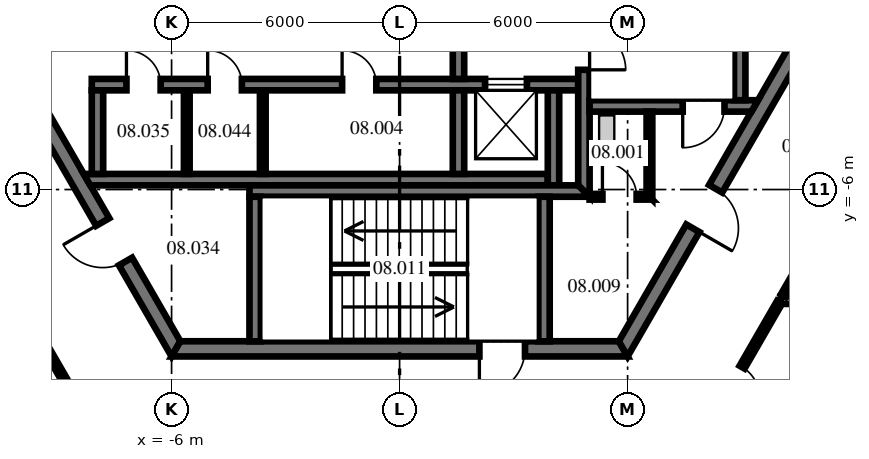
"""IFC4 building model, lengths in metres.
Left out: names, types, materials, properties, quantities, classifications, styles, units other than length and angle.
Written with IfcOpenShell. Run it as: python <this file> out.ifc"""

import sys

from ifc_helpers import new_model, si_unit, direction, frame, frame_2d, origin, place, context, subcontext, project, spatial, polyline, rectangle, outline, extrude, source, transform, mapped, element, fill, save


model = new_model("IFC4")
c1 = context("Model", 3, precision=1e-05, world=origin(), true_north=direction((0.0, 1.0)))
c2 = subcontext(c1, "Body", "Model", "MODEL_VIEW")
j1 = project(units=[si_unit("LENGTHUNIT", "METRE"), si_unit("PLANEANGLEUNIT", "RADIAN")], contexts=[c1])
p1 = place(None, origin())
s1 = spatial("IfcSite", under=j1, at=p1, CompositionType="ELEMENT")
p2 = place(p1, origin())
s2 = spatial("IfcBuilding", under=s1, at=p2, CompositionType="ELEMENT")
p3 = place(p2, frame((0.0, 0.0, 37.5)))
s3 = spatial("IfcBuildingStorey", under=s2, at=p3, CompositionType="ELEMENT", Elevation=37.5)
m1 = source(origin(), c2, "Body", "SweptSolid", [
    extrude(outline(polyline([(-0.115, -0.2), (11.885, -0.2), (11.654, 0.2), (0.115, 0.2), (-0.115, -0.2)])), origin(), (0.0, 0.0, 1.0), 4.1),
])
p4 = place(p3, frame((-11.769, 0.0, 0.0), z_axis=(0.0, 0.0, 1.0), x_axis=(0.499996592174, -0.866027371285, 0.0)))
e1 = element("IfcWall", 1, at=p4, inside=s3, PredefinedType="SHEAR", context=c2, shape_type="MappedRepresentation", body=[
    mapped(m1, transform((0.0, 0.0, 0.0), scale=1.0)),
])
p5 = place(p4, frame((1.405, 0.0, 0.0)))
e2 = element("IfcOpeningElement", 2, at=p5, cuts=e1, PredefinedType="OPENING", context=c2, shape_type="SweptSolid", body=[
    extrude(rectangle(XDim=1.8, YDim=2.1, at=frame_2d((0.9, 1.05))), frame((0.0, 0.21, 0.0), z_axis=(0.0, -1.0, 0.0), x_axis=(1.0, 0.0, 0.0)), (0.0, 0.0, 1.0), 0.42),
])
p6 = place(p4, frame((7.915, 0.0, 0.0)))
e3 = element("IfcOpeningElement", 3, at=p6, cuts=e1, PredefinedType="OPENING", context=c2, shape_type="SweptSolid", body=[
    extrude(rectangle(XDim=1.2, YDim=2.1, at=frame_2d((0.6, 1.05))), frame((0.0, 0.21, 0.0), z_axis=(0.0, -1.0, 0.0), x_axis=(1.0, 0.0, 0.0)), (0.0, 0.0, 1.0), 0.42),
])
p7 = place(p3, frame((-5.885, -10.192, 0.0), z_axis=(0.0, 0.0, 1.0), x_axis=(1.0, 0.0, 0.0)))
e4 = element("IfcWall", 4, at=p7, inside=s3, PredefinedType="SHEAR", context=c2, shape_type="MappedRepresentation", body=[
    mapped(m1, transform((0.0, 0.0, 0.0), scale=1.0)),
])
p8 = place(p7, frame((7.985, 0.0, 0.0)))
e5 = element("IfcOpeningElement", 5, at=p8, cuts=e4, PredefinedType="OPENING", context=c2, shape_type="SweptSolid", body=[
    extrude(rectangle(XDim=1.2, YDim=2.1, at=frame_2d((0.6, 1.05))), frame((0.0, 0.21, 0.0), z_axis=(0.0, -1.0, 0.0), x_axis=(1.0, 0.0, 0.0)), (0.0, 0.0, 1.0), 0.42),
])
p9 = place(p3, frame((5.885, -10.192, 0.0), z_axis=(0.0, 0.0, 1.0), x_axis=(0.499996592174, 0.866027371285, 0.0)))
e6 = element("IfcWall", 6, at=p9, inside=s3, PredefinedType="SHEAR", context=c2, shape_type="MappedRepresentation", body=[
    mapped(m1, transform((0.0, 0.0, 0.0), scale=1.0)),
])
p10 = place(p9, frame((3.665, 0.0, 0.0)))
e7 = element("IfcOpeningElement", 7, at=p10, cuts=e6, PredefinedType="OPENING", context=c2, shape_type="SweptSolid", body=[
    extrude(rectangle(XDim=1.2, YDim=2.1, at=frame_2d((0.6, 1.05))), frame((0.0, 0.21, 0.0), z_axis=(0.0, -1.0, 0.0), x_axis=(1.0, 0.0, 0.0)), (0.0, 0.0, 1.0), 0.42),
])
m2 = source(origin(), c2, "Body", "SweptSolid", [
    extrude(rectangle(XDim=12.8, YDim=0.3, at=frame_2d((6.4, 0.0))), origin(), (0.0, 0.0, 1.0), 4.1),
])
p11 = place(p3, frame((-8.1, -3.24, 0.0), z_axis=(0.0, 0.0, 1.0), x_axis=(1.0, 0.0, 0.0)))
e8 = element("IfcWall", 8, at=p11, inside=s3, PredefinedType="SHEAR", context=c2, shape_type="MappedRepresentation", body=[
    mapped(m2, transform((0.0, 0.0, 0.0), scale=1.0)),
])
p12 = place(p11, frame((0.913, 0.0, 0.0)))
e9 = element("IfcOpeningElement", 9, at=p12, cuts=e8, PredefinedType="OPENING", context=c2, shape_type="SweptSolid", body=[
    extrude(rectangle(XDim=0.9, YDim=2.1, at=frame_2d((0.45, 1.05))), frame((0.0, 0.16, 0.0), z_axis=(0.0, -1.0, 0.0), x_axis=(1.0, 0.0, 0.0)), (0.0, 0.0, 1.0), 0.32),
])
p13 = place(p11, frame((3.05, 0.0, 0.0)))
e10 = element("IfcOpeningElement", 10, at=p13, cuts=e8, PredefinedType="OPENING", context=c2, shape_type="SweptSolid", body=[
    extrude(rectangle(XDim=0.9, YDim=2.1, at=frame_2d((0.45, 1.05))), frame((0.0, 0.16, 0.0), z_axis=(0.0, -1.0, 0.0), x_axis=(1.0, 0.0, 0.0)), (0.0, 0.0, 1.0), 0.32),
])
p14 = place(p11, frame((6.587, 0.0, 0.0)))
e11 = element("IfcOpeningElement", 11, at=p14, cuts=e8, PredefinedType="OPENING", context=c2, shape_type="SweptSolid", body=[
    extrude(rectangle(XDim=0.9, YDim=2.1, at=frame_2d((0.45, 1.05))), frame((0.0, 0.16, 0.0), z_axis=(0.0, -1.0, 0.0), x_axis=(1.0, 0.0, 0.0)), (0.0, 0.0, 1.0), 0.32),
])
p15 = place(p11, frame((10.35, 0.0, 0.0)))
e12 = element("IfcOpeningElement", 12, at=p15, cuts=e8, PredefinedType="OPENING", context=c2, shape_type="SweptSolid", body=[
    extrude(rectangle(XDim=1.1, YDim=2.1, at=frame_2d((0.55, 1.05))), frame((0.0, 0.16, 0.0), z_axis=(0.0, -1.0, 0.0), x_axis=(1.0, 0.0, 0.0)), (0.0, 0.0, 1.0), 0.32),
])
m3 = source(origin(), c2, "Body", "SweptSolid", [
    extrude(outline(polyline([(12.0, -0.15), (-0.04, -0.15), (-0.213, 0.15), (12.0, 0.15), (12.0, -0.15)])), origin(), (0.0, 0.0, 1.0), 4.1),
])
p16 = place(p3, frame((-8.1, -5.74, 0.0), z_axis=(0.0, 0.0, 1.0), x_axis=(1.0, 0.0, 0.0)))
e13 = element("IfcWall", 13, at=p16, inside=s3, PredefinedType="SHEAR", context=c2, shape_type="MappedRepresentation", body=[
    mapped(m3, transform((0.0, 0.0, 0.0), scale=1.0)),
])
m4 = source(origin(), c2, "Body", "SweptSolid", [
    extrude(rectangle(XDim=2.2, YDim=0.3, at=frame_2d((1.1, 0.0))), origin(), (0.0, 0.0, 1.0), 4.1),
])
for number, where, z_axis, x_axis in (
    (14, (-7.95, -5.59, 0.0), (0.0, 0.0, 1.0), (0.0, 1.0, 0.0)),
    (15, (1.55, -5.59, 0.0), (0.0, 0.0, 1.0), (0.0, 1.0, 0.0)),
):
    element("IfcWall", number, at=place(p3, frame(where, z_axis=z_axis, x_axis=x_axis)), inside=s3, PredefinedType="SHEAR", context=c2, shape_type="MappedRepresentation", body=[
        mapped(m4, transform((0.0, 0.0, 0.0), scale=1.0)),
    ])
m5 = source(origin(), c2, "Body", "SweptSolid", [
    extrude(rectangle(XDim=2.5, YDim=0.3, at=frame_2d((1.25, 0.0))), origin(), (0.0, 0.0, 1.0), 4.1),
])
p17 = place(p3, frame((4.05, -5.89, 0.0), z_axis=(0.0, 0.0, 1.0), x_axis=(0.0, 1.0, 0.0)))
e16 = element("IfcWall", 16, at=p17, inside=s3, PredefinedType="SHEAR", context=c2, shape_type="MappedRepresentation", body=[
    mapped(m5, transform((0.0, 0.0, 0.0), scale=1.0)),
])
m6 = source(origin(), c2, "Body", "SweptSolid", [
    extrude(rectangle(XDim=3.0, YDim=0.3, at=frame_2d((1.5, 0.0))), origin(), (0.0, 0.0, 1.0), 4.1),
])
p18 = place(p3, frame((1.55, -3.09, 0.0), z_axis=(0.0, 0.0, 1.0), x_axis=(0.0, 1.0, 0.0)))
e17 = element("IfcWall", 17, at=p18, inside=s3, PredefinedType="SHEAR", context=c2, shape_type="MappedRepresentation", body=[
    mapped(m6, transform((0.0, 0.0, 0.0), scale=1.0)),
])
p19 = place(p18, frame((0.9, 0.0, 0.0)))
e18 = element("IfcOpeningElement", 18, at=p19, cuts=e17, PredefinedType="OPENING", context=c2, shape_type="SweptSolid", body=[
    extrude(rectangle(XDim=1.2, YDim=2.1, at=frame_2d((0.6, 1.05))), frame((0.0, 0.16, 0.0), z_axis=(0.0, -1.0, 0.0), x_axis=(1.0, 0.0, 0.0)), (0.0, 0.0, 1.0), 0.32),
])
m7 = source(origin(), c2, "Body", "SweptSolid", [
    extrude(outline(polyline([(-0.15, -0.15), (9.99, -0.15), (9.99, 0.15), (0.15, 0.15), (-0.15, -0.15)])), origin(), (0.0, 0.0, 1.0), 4.1),
])
p20 = place(p3, frame((4.85, -6.04, 0.0), z_axis=(0.0, 0.0, 1.0), x_axis=(0.0, 1.0, 0.0)))
e19 = element("IfcWall", 19, at=p20, inside=s3, PredefinedType="SHEAR", context=c2, shape_type="MappedRepresentation", body=[
    mapped(m7, transform((0.0, 0.0, 0.0), scale=1.0)),
])
p21 = place(p20, frame((3.19, 0.0, 0.0)))
e20 = element("IfcOpeningElement", 20, at=p21, cuts=e19, PredefinedType="OPENING", context=c2, shape_type="SweptSolid", body=[
    extrude(rectangle(XDim=1.1, YDim=2.1, at=frame_2d((0.55, 1.05))), frame((0.0, 0.16, 0.0), z_axis=(0.0, -1.0, 0.0), x_axis=(1.0, 0.0, 0.0)), (0.0, 0.0, 1.0), 0.32),
])
m8 = source(origin(), c2, "Body", "SweptSolid", [
    extrude(outline(polyline([(0.0, -0.15), (0.0, 0.15), (4.433, 0.15), (4.26, -0.15), (0.0, -0.15)])), origin(), (0.0, 0.0, 1.0), 4.1),
])
p22 = place(p3, frame((5.0, -3.8, 0.0), z_axis=(0.0, 0.0, 1.0), x_axis=(1.0, 0.0, 0.0)))
e21 = element("IfcWall", 21, at=p22, inside=s3, PredefinedType="SHEAR", context=c2, shape_type="MappedRepresentation", body=[
    mapped(m8, transform((0.0, 0.0, 0.0), scale=1.0)),
])
p23 = place(p22, frame((2.45, 0.0, 0.0)))
e22 = element("IfcOpeningElement", 22, at=p23, cuts=e21, PredefinedType="OPENING", context=c2, shape_type="SweptSolid", body=[
    extrude(rectangle(XDim=1.1, YDim=2.1, at=frame_2d((0.55, 1.05))), frame((0.0, 0.16, 0.0), z_axis=(0.0, -1.0, 0.0), x_axis=(1.0, 0.0, 0.0)), (0.0, 0.0, 1.0), 0.32),
])
m9 = source(origin(), c2, "Body", "SweptSolid", [
    extrude(rectangle(XDim=7.3, YDim=0.3, at=frame_2d((3.65, 0.0))), origin(), (0.0, 0.0, 1.0), 4.1),
])
p24 = place(p3, frame((8.95, -3.65, 0.0), z_axis=(0.0, 0.0, 1.0), x_axis=(0.0, 1.0, 0.0)))
e23 = element("IfcWall", 23, at=p24, inside=s3, PredefinedType="SHEAR", context=c2, shape_type="MappedRepresentation", body=[
    mapped(m9, transform((0.0, 0.0, 0.0), scale=1.0)),
])
m10 = source(origin(), c2, "Body", "SweptSolid", [
    extrude(outline(polyline([(0.0, -0.15), (8.95, -0.15), (8.65, 0.15), (0.0, 0.15), (0.0, -0.15)])), origin(), (0.0, 0.0, 1.0), 4.1),
])
p25 = place(p3, frame((-3.95, -6.04, 0.0), z_axis=(0.0, 0.0, 1.0), x_axis=(1.0, 0.0, 0.0)))
e24 = element("IfcWall", 24, at=p25, inside=s3, PredefinedType="SHEAR", context=c2, shape_type="MappedRepresentation", body=[
    mapped(m10, transform((0.0, 0.0, 0.0), scale=1.0)),
])
m11 = source(origin(), c2, "Body", "SweptSolid", [
    extrude(outline(polyline([(3.8, -0.15), (-0.004, -0.15), (-0.004, 0.15), (3.8, 0.15), (3.8, -0.15)])), origin(), (0.0, 0.0, 1.0), 4.1),
])
for number, where, z_axis, x_axis in (
    (25, (-3.8, -9.99, 0.0), (0.0, 0.0, 1.0), (0.0, 1.0, 0.0)),
    (26, (3.8, -9.99, 0.0), (0.0, 0.0, 1.0), (0.0, 1.0, 0.0)),
):
    element("IfcWall", number, at=place(p3, frame(where, z_axis=z_axis, x_axis=x_axis)), inside=s3, PredefinedType="SHEAR", context=c2, shape_type="MappedRepresentation", body=[
        mapped(m11, transform((0.0, 0.0, 0.0), scale=1.0)),
    ])
m12 = source(origin(), c2, "Body", "SweptSolid", [
    extrude(outline(polyline([(0.0, -0.075), (1.65, -0.075), (1.5, 0.075), (0.0, 0.075), (0.0, -0.075)])), origin(), (0.0, 0.0, 1.0), 4.1),
])
p26 = place(p3, frame((5.0, -6.19, 0.0), z_axis=(0.0, 0.0, 1.0), x_axis=(1.0, 0.0, 0.0)))
e27 = element("IfcWall", 27, at=p26, inside=s3, PredefinedType="PARTITIONING", context=c2, shape_type="MappedRepresentation", body=[
    mapped(m12, transform((0.0, 0.0, 0.0), scale=1.0)),
])
p27 = place(p26, frame((0.337, 0.0, 0.0)))
e28 = element("IfcOpeningElement", 28, at=p27, cuts=e27, PredefinedType="OPENING", context=c2, shape_type="SweptSolid", body=[
    extrude(rectangle(XDim=0.9, YDim=2.1, at=frame_2d((0.45, 1.05))), frame((0.0, 0.085, 0.0), z_axis=(0.0, -1.0, 0.0), x_axis=(1.0, 0.0, 0.0)), (0.0, 0.0, 1.0), 0.17),
])
m13 = source(origin(), c2, "Body", "SweptSolid", [
    extrude(outline(polyline([(-0.075, -0.075), (2.24, -0.075), (2.24, 0.075), (0.075, 0.075), (-0.075, -0.075)])), origin(), (0.0, 0.0, 1.0), 4.1),
])
p28 = place(p3, frame((6.575, -6.19, 0.0), z_axis=(0.0, 0.0, 1.0), x_axis=(0.0, 1.0, 0.0)))
e29 = element("IfcWall", 29, at=p28, inside=s3, PredefinedType="PARTITIONING", context=c2, shape_type="MappedRepresentation", body=[
    mapped(m13, transform((0.0, 0.0, 0.0), scale=1.0)),
])
m14 = source(origin(), c2, "Body", "SweptSolid", [
    extrude(rectangle(XDim=2.2, YDim=0.15, at=frame_2d((1.1, 0.0))), origin(), (0.0, 0.0, 1.0), 4.1),
])
for number, where, z_axis, x_axis in (
    (30, (-5.6, -5.59, 0.0), (0.0, 0.0, 1.0), (0.0, 1.0, 0.0)),
    (31, (-3.6, -5.59, 0.0), (0.0, 0.0, 1.0), (0.0, 1.0, 0.0)),
):
    element("IfcWall", number, at=place(p3, frame(where, z_axis=z_axis, x_axis=x_axis)), inside=s3, PredefinedType="PARTITIONING", context=c2, shape_type="MappedRepresentation", body=[
        mapped(m14, transform((0.0, 0.0, 0.0), scale=1.0)),
    ])
p29 = place(p3, frame((-9.527, -9.783, 0.0), z_axis=(0.0, 0.0, 1.0), x_axis=(0.500013098431, -0.86601784127, 0.0)))
e32 = element("IfcWall", 32, at=p29, inside=s3, PredefinedType="PARTITIONING", context=c2, shape_type="SweptSolid", body=[
    extrude(rectangle(XDim=3.83, YDim=0.15, at=frame_2d((1.915, 0.0))), origin(), (0.0, 0.0, 1.0), 4.1),
])
m15 = source(origin(), c2, "Body", "SweptSolid", [
    extrude(rectangle(XDim=11.455, YDim=0.2, at=frame_2d((5.728, 0.0))), origin(), (0.0, 0.0, 1.0), 3.343),
])
p30 = place(p3, frame((10.031, -8.91, 0.0), z_axis=(0.0, 0.0, 1.0), x_axis=(1.0, 0.0, 0.0)))
e33 = element("IfcWall", 33, at=p30, inside=s3, PredefinedType="PARTITIONING", context=c2, shape_type="MappedRepresentation", body=[
    mapped(m15, transform((0.0, 0.0, 0.0), scale=1.0)),
])
p31 = place(p3, frame((7.603, -13.116, 0.0), z_axis=(0.0, 0.0, 1.0), x_axis=(0.500011970786, 0.866018492338, 0.0)))
e34 = element("IfcWall", 34, at=p31, inside=s3, PredefinedType="PARTITIONING", context=c2, shape_type="SweptSolid", body=[
    extrude(rectangle(XDim=4.793, YDim=0.15, at=frame_2d((2.397, 0.0))), origin(), (0.0, 0.0, 1.0), 4.1),
])
p32 = place(p31, frame((1.92, 0.0, 0.0)))
e35 = element("IfcOpeningElement", 35, at=p32, cuts=e34, PredefinedType="OPENING", context=c2, shape_type="SweptSolid", body=[
    extrude(rectangle(XDim=0.9, YDim=2.1, at=frame_2d((0.45, 1.05))), frame((0.0, 0.085, 0.0), z_axis=(0.0, -1.0, 0.0), x_axis=(1.0, 0.0, 0.0)), (0.0, 0.0, 1.0), 0.17),
])
p33 = place(p3, frame((10.1, -8.792, 0.0), z_axis=(0.0, 0.0, 1.0), x_axis=(0.499985875816, 0.866033558232, 0.0)))
e36 = element("IfcWall", 36, at=p33, inside=s3, PredefinedType="PARTITIONING", context=c2, shape_type="SweptSolid", body=[
    extrude(rectangle(XDim=10.082, YDim=0.15, at=frame_2d((5.041, 0.0))), origin(), (0.0, 0.0, 1.0), 4.1),
])
p34 = place(p8, frame((1.2, 0.0, 0.0), z_axis=(0.0, 0.0, 1.0), x_axis=(-1.0, 0.0, 0.0)))
e37 = element("IfcDoor", 37, at=p34, inside=s3, OperationType="SINGLE_SWING_RIGHT", PredefinedType="DOOR", context=c2, shape_type="SweptSolid", body=[
    extrude(rectangle(XDim=1.2, YDim=2.1, at=frame_2d((0.6, 1.05))), frame((0.0, 0.025, 0.0), z_axis=(0.0, -1.0, 0.0), x_axis=(1.0, 0.0, 0.0)), (0.0, 0.0, 1.0), 0.05),
])
fill(e5, e37)
p35 = place(p10, frame((1.2, 0.0, 0.0), z_axis=(0.0, 0.0, 1.0), x_axis=(-1.0, 0.0, 0.0)))
e38 = element("IfcDoor", 38, at=p35, inside=s3, OperationType="SINGLE_SWING_RIGHT", PredefinedType="DOOR", context=c2, shape_type="SweptSolid", body=[
    extrude(rectangle(XDim=1.2, YDim=2.1, at=frame_2d((0.6, 1.05))), frame((0.0, 0.025, 0.0), z_axis=(0.0, -1.0, 0.0), x_axis=(1.0, 0.0, 0.0)), (0.0, 0.0, 1.0), 0.05),
])
fill(e7, e38)
p36 = place(p6, frame((1.2, 0.0, 0.0), z_axis=(0.0, 0.0, 1.0), x_axis=(-1.0, 0.0, 0.0)))
e39 = element("IfcDoor", 39, at=p36, inside=s3, OperationType="SINGLE_SWING_RIGHT", PredefinedType="DOOR", context=c2, shape_type="SweptSolid", body=[
    extrude(rectangle(XDim=1.2, YDim=2.1, at=frame_2d((0.6, 1.05))), frame((0.0, 0.025, 0.0), z_axis=(0.0, -1.0, 0.0), x_axis=(1.0, 0.0, 0.0)), (0.0, 0.0, 1.0), 0.05),
])
fill(e3, e39)
p37 = place(p21, frame((1.1, 0.0, 0.0), z_axis=(0.0, 0.0, 1.0), x_axis=(-1.0, 0.0, 0.0)))
e40 = element("IfcDoor", 40, at=p37, inside=s3, OperationType="SINGLE_SWING_RIGHT", PredefinedType="DOOR", context=c2, shape_type="SweptSolid", body=[
    extrude(rectangle(XDim=1.1, YDim=2.1, at=frame_2d((0.55, 1.05))), frame((0.0, 0.025, 0.0), z_axis=(0.0, -1.0, 0.0), x_axis=(1.0, 0.0, 0.0)), (0.0, 0.0, 1.0), 0.05),
])
fill(e20, e40)
p38 = place(p23, frame((1.1, 0.0, 0.0), z_axis=(0.0, 0.0, 1.0), x_axis=(-1.0, 0.0, 0.0)))
e41 = element("IfcDoor", 41, at=p38, inside=s3, OperationType="SINGLE_SWING_RIGHT", PredefinedType="DOOR", context=c2, shape_type="SweptSolid", body=[
    extrude(rectangle(XDim=1.1, YDim=2.1, at=frame_2d((0.55, 1.05))), frame((0.0, 0.025, 0.0), z_axis=(0.0, -1.0, 0.0), x_axis=(1.0, 0.0, 0.0)), (0.0, 0.0, 1.0), 0.05),
])
fill(e22, e41)
p39 = place(p27, origin())
e42 = element("IfcDoor", 42, at=p39, inside=s3, OperationType="SINGLE_SWING_LEFT", PredefinedType="DOOR", context=c2, shape_type="SweptSolid", body=[
    extrude(rectangle(XDim=0.9, YDim=2.1, at=frame_2d((0.45, 1.05))), frame((0.0, 0.025, 0.0), z_axis=(0.0, -1.0, 0.0), x_axis=(1.0, 0.0, 0.0)), (0.0, 0.0, 1.0), 0.05),
])
fill(e28, e42)
p40 = place(p12, origin())
e43 = element("IfcDoor", 43, at=p40, inside=s3, OperationType="SINGLE_SWING_LEFT", PredefinedType="DOOR", context=c2, shape_type="SweptSolid", body=[
    extrude(rectangle(XDim=0.9, YDim=2.1, at=frame_2d((0.45, 1.05))), frame((0.0, 0.025, 0.0), z_axis=(0.0, -1.0, 0.0), x_axis=(1.0, 0.0, 0.0)), (0.0, 0.0, 1.0), 0.05),
])
fill(e9, e43)
p41 = place(p13, origin())
e44 = element("IfcDoor", 44, at=p41, inside=s3, OperationType="SINGLE_SWING_LEFT", PredefinedType="DOOR", context=c2, shape_type="SweptSolid", body=[
    extrude(rectangle(XDim=0.9, YDim=2.1, at=frame_2d((0.45, 1.05))), frame((0.0, 0.025, 0.0), z_axis=(0.0, -1.0, 0.0), x_axis=(1.0, 0.0, 0.0)), (0.0, 0.0, 1.0), 0.05),
])
fill(e10, e44)
p42 = place(p14, origin())
e45 = element("IfcDoor", 45, at=p42, inside=s3, OperationType="SINGLE_SWING_LEFT", PredefinedType="DOOR", context=c2, shape_type="SweptSolid", body=[
    extrude(rectangle(XDim=0.9, YDim=2.1, at=frame_2d((0.45, 1.05))), frame((0.0, 0.025, 0.0), z_axis=(0.0, -1.0, 0.0), x_axis=(1.0, 0.0, 0.0)), (0.0, 0.0, 1.0), 0.05),
])
fill(e11, e45)
p43 = place(p15, origin())
e46 = element("IfcDoor", 46, at=p43, inside=s3, OperationType="DOUBLE_DOOR_SLIDING", PredefinedType="DOOR", context=c2, shape_type="SweptSolid", body=[
    extrude(rectangle(XDim=1.1, YDim=2.1, at=frame_2d((0.55, 1.05))), frame((0.0, 0.025, 0.0), z_axis=(0.0, -1.0, 0.0), x_axis=(1.0, 0.0, 0.0)), (0.0, 0.0, 1.0), 0.05),
])
fill(e12, e46)
p44 = place(p32, origin())
e47 = element("IfcDoor", 47, at=p44, inside=s3, OperationType="SINGLE_SWING_RIGHT", PredefinedType="DOOR", context=c2, shape_type="SweptSolid", body=[
    extrude(rectangle(XDim=0.9, YDim=2.1, at=frame_2d((0.45, 1.05))), frame((0.0, 0.025, 0.0), z_axis=(0.0, -1.0, 0.0), x_axis=(1.0, 0.0, 0.0)), (0.0, 0.0, 1.0), 0.05),
])
fill(e35, e47)
save(model, sys.argv[1])
